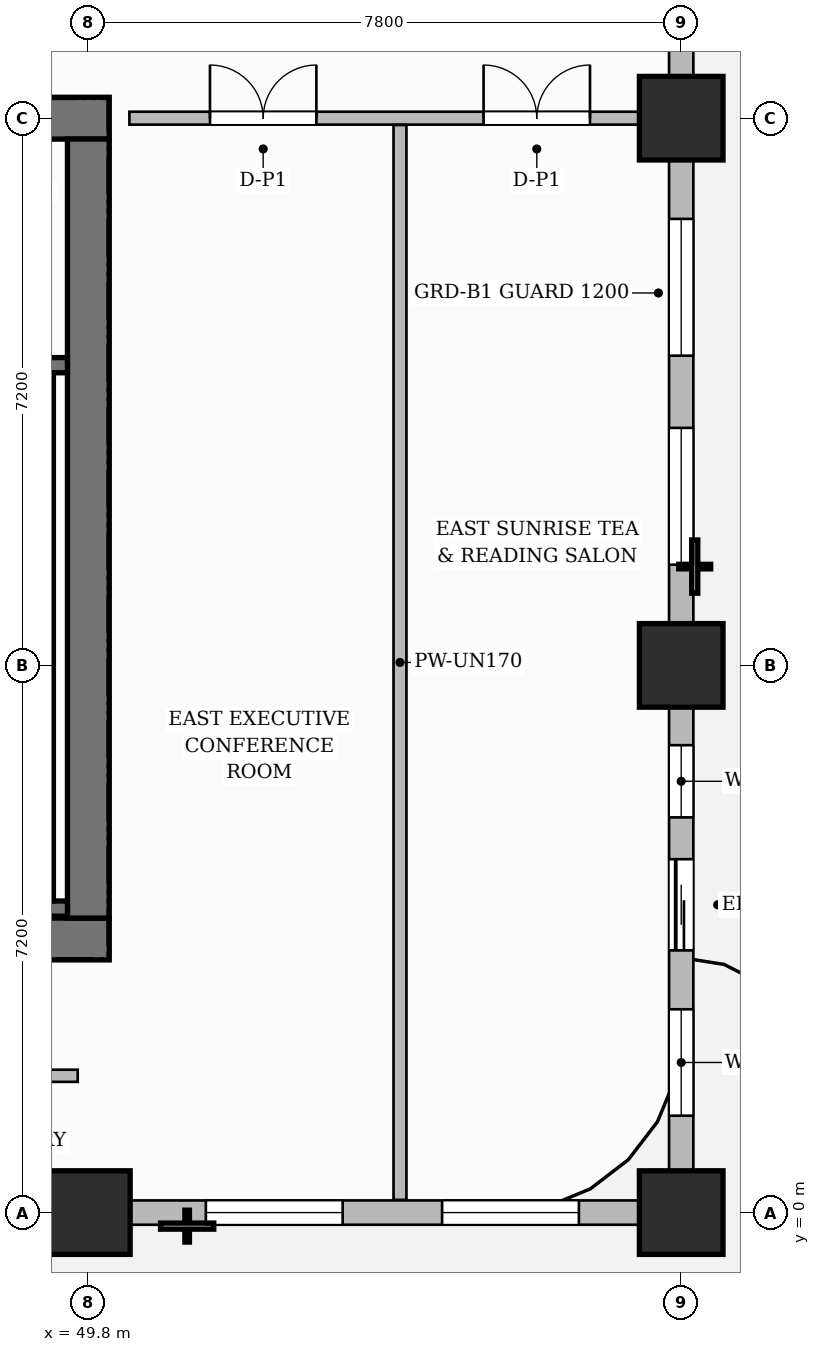
"""IFC4 building model, lengths in metres.
Left out: names, types, materials, properties, quantities, classifications, styles, units other than length and angle.
Written with IfcOpenShell. Run it as: python <this file> out.ifc"""

import sys

from ifc_helpers import new_model, si_unit, direction, frame, frame_2d, origin, origin_2d, place, context, subcontext, project, spatial, rectangle, extrude, source, transform, mapped, element, fill, save


model = new_model("IFC4")
c1 = context("Model", 3, precision=1e-05, world=origin(), true_north=direction((0.0, 1.0)))
c2 = subcontext(c1, "Body", "Model", "MODEL_VIEW")
j1 = project(units=[si_unit("LENGTHUNIT", "METRE"), si_unit("PLANEANGLEUNIT", "RADIAN")], contexts=[c1])
p1 = place(None, origin())
s1 = spatial("IfcSite", under=j1, at=p1, CompositionType="ELEMENT")
p2 = place(p1, origin())
s2 = spatial("IfcBuilding", under=s1, at=p2, CompositionType="ELEMENT")
p3 = place(p2, frame((0.0, 0.0, 99.0)))
s3 = spatial("IfcBuildingStorey", under=s2, at=p3, CompositionType="ELEMENT", Elevation=99.0)
p4 = place(p3, frame((34.525, 3.6, 0.0), z_axis=(0.0, 0.0, 1.0), x_axis=(1.0, 0.0, 0.0)))
e1 = element("IfcWall", 1, at=p4, inside=s3, PredefinedType="SHEAR", context=c2, shape_type="SweptSolid", body=[
    extrude(rectangle(XDim=15.55, YDim=0.55, at=frame_2d((7.775, 0.0))), origin(), (0.0, 0.0, 1.0), 3.7),
])
p5 = place(p4, frame((4.745, 0.0, 0.0)))
e2 = element("IfcOpeningElement", 2, at=p5, cuts=e1, PredefinedType="OPENING", context=c2, shape_type="SweptSolid", body=[
    extrude(rectangle(XDim=0.9, YDim=2.1, at=frame_2d((0.45, 1.05))), frame((0.0, 0.285, 0.0), z_axis=(0.0, -1.0, 0.0), x_axis=(1.0, 0.0, 0.0)), (0.0, 0.0, 1.0), 0.57),
])
p6 = place(p4, frame((7.125, 0.0, 0.0)))
e3 = element("IfcOpeningElement", 3, at=p6, cuts=e1, PredefinedType="OPENING", context=c2, shape_type="SweptSolid", body=[
    extrude(rectangle(XDim=0.9, YDim=2.1, at=frame_2d((0.45, 1.05))), frame((0.0, 0.285, 0.0), z_axis=(0.0, -1.0, 0.0), x_axis=(1.0, 0.0, 0.0)), (0.0, 0.0, 1.0), 0.57),
])
p7 = place(p3, frame((34.525, 14.4, 0.0), z_axis=(0.0, 0.0, 1.0), x_axis=(1.0, 0.0, 0.0)))
e4 = element("IfcWall", 4, at=p7, inside=s3, PredefinedType="SHEAR", context=c2, shape_type="SweptSolid", body=[
    extrude(rectangle(XDim=15.55, YDim=0.55, at=frame_2d((7.775, 0.0))), origin(), (0.0, 0.0, 1.0), 3.7),
])
p8 = place(p7, frame((5.405, 0.0, 0.0)))
e5 = element("IfcOpeningElement", 5, at=p8, cuts=e4, PredefinedType="OPENING", context=c2, shape_type="SweptSolid", body=[
    extrude(rectangle(XDim=1.5, YDim=2.2, at=frame_2d((0.75, 1.1))), frame((0.0, 0.285, 0.0), z_axis=(0.0, -1.0, 0.0), x_axis=(1.0, 0.0, 0.0)), (0.0, 0.0, 1.0), 0.57),
])
p9 = place(p7, frame((1.62, 0.0, 0.0)))
e6 = element("IfcOpeningElement", 6, at=p9, cuts=e4, PredefinedType="OPENING", context=c2, shape_type="SweptSolid", body=[
    extrude(rectangle(XDim=1.05, YDim=2.15, at=frame_2d((0.525, 1.075))), frame((0.0, 0.285, 0.0), z_axis=(0.0, -1.0, 0.0), x_axis=(1.0, 0.0, 0.0)), (0.0, 0.0, 1.0), 0.57),
])
p10 = place(p7, frame((11.25, 0.0, 0.0)))
e7 = element("IfcOpeningElement", 7, at=p10, cuts=e4, PredefinedType="OPENING", context=c2, shape_type="SweptSolid", body=[
    extrude(rectangle(XDim=1.05, YDim=2.15, at=frame_2d((0.525, 1.075))), frame((0.0, 0.285, 0.0), z_axis=(0.0, -1.0, 0.0), x_axis=(1.0, 0.0, 0.0)), (0.0, 0.0, 1.0), 0.57),
])
p11 = place(p3, frame((49.8, 3.875, 0.0), z_axis=(0.0, 0.0, 1.0), x_axis=(0.0, 1.0, 0.0)))
e8 = element("IfcWall", 8, at=p11, inside=s3, PredefinedType="SHEAR", context=c2, shape_type="SweptSolid", body=[
    extrude(rectangle(XDim=10.25, YDim=0.55, at=frame_2d((5.125, 0.0))), origin(), (0.0, 0.0, 1.0), 3.7),
])
m1 = source(origin(), c2, "Body", "SweptSolid", [
    extrude(rectangle(XDim=1.1, YDim=1.1, at=origin_2d()), origin(), (0.0, 0.0, 1.0), 3.7),
])
for number, where, z_axis, x_axis in (
    (9, (49.8, 0.0, 0.0), (0.0, 0.0, 1.0), (1.0, 0.0, 0.0)),
    (10, (57.6, 0.0, 0.0), (0.0, 0.0, 1.0), (1.0, 0.0, 0.0)),
    (11, (57.6, 7.2, 0.0), (0.0, 0.0, 1.0), (1.0, 0.0, 0.0)),
    (12, (57.6, 14.4, 0.0), (0.0, 0.0, 1.0), (1.0, 0.0, 0.0)),
):
    element("IfcColumn", number, at=place(p3, frame(where, z_axis=z_axis, x_axis=x_axis)), inside=s3, PredefinedType="COLUMN", context=c2, shape_type="MappedRepresentation", body=[
        mapped(m1, transform((0.0, 0.0, 0.0), scale=1.0)),
    ])
p12 = place(p3, frame((43.12, 4.0, 0.0), z_axis=(0.0, 0.0, 1.0), x_axis=(1.0, 0.0, 0.0)))
e13 = element("IfcWall", 13, at=p12, inside=s3, PredefinedType="SHEAR", context=c2, shape_type="SweptSolid", body=[
    extrude(rectangle(XDim=6.405, YDim=0.2, at=frame_2d((3.202, 0.0))), origin(), (0.0, 0.0, 1.0), 3.7),
])
p13 = place(p3, frame((49.24, 4.1, 0.0), z_axis=(0.0, 0.0, 1.0), x_axis=(0.0, 1.0, 0.0)))
e14 = element("IfcWall", 14, at=p13, inside=s3, PredefinedType="SHEAR", context=c2, shape_type="SweptSolid", body=[
    extrude(rectangle(XDim=6.95, YDim=0.2, at=frame_2d((3.475, 0.0))), origin(), (0.0, 0.0, 1.0), 3.7),
])
p14 = place(p3, frame((43.12, 11.15, 0.0), z_axis=(0.0, 0.0, 1.0), x_axis=(1.0, 0.0, 0.0)))
e15 = element("IfcWall", 15, at=p14, inside=s3, PredefinedType="SHEAR", context=c2, shape_type="SweptSolid", body=[
    extrude(rectangle(XDim=6.405, YDim=0.2, at=frame_2d((3.202, 0.0))), origin(), (0.0, 0.0, 1.0), 3.7),
])
p15 = place(p14, frame((1.045, 0.0, 0.0)))
e16 = element("IfcOpeningElement", 16, at=p15, cuts=e15, PredefinedType="OPENING", context=c2, shape_type="SweptSolid", body=[
    extrude(rectangle(XDim=1.05, YDim=2.2, at=frame_2d((0.525, 1.1))), frame((0.0, 0.11, 0.0), z_axis=(0.0, -1.0, 0.0), x_axis=(1.0, 0.0, 0.0)), (0.0, 0.0, 1.0), 0.22),
])
p16 = place(p14, frame((4.125, 0.0, 0.0)))
e17 = element("IfcOpeningElement", 17, at=p16, cuts=e15, PredefinedType="OPENING", context=c2, shape_type="SweptSolid", body=[
    extrude(rectangle(XDim=1.05, YDim=2.2, at=frame_2d((0.525, 1.1))), frame((0.0, 0.11, 0.0), z_axis=(0.0, -1.0, 0.0), x_axis=(1.0, 0.0, 0.0)), (0.0, 0.0, 1.0), 0.22),
])
p17 = place(p3, frame((30.29, 1.8, 0.0), z_axis=(0.0, 0.0, 1.0), x_axis=(1.0, 0.0, 0.0)))
e18 = element("IfcWall", 18, at=p17, inside=s3, PredefinedType="PARTITIONING", context=c2, shape_type="SweptSolid", body=[
    extrude(rectangle(XDim=19.37, YDim=0.16, at=frame_2d((9.685, 0.0))), origin(), (0.0, 0.0, 1.0), 3.45),
])
p18 = place(p17, frame((5.213, 0.0, 0.0)))
e19 = element("IfcOpeningElement", 19, at=p18, cuts=e18, PredefinedType="OPENING", context=c2, shape_type="SweptSolid", body=[
    extrude(rectangle(XDim=0.9, YDim=2.15, at=frame_2d((0.45, 1.075))), frame((0.0, 0.09, 0.0), z_axis=(0.0, -1.0, 0.0), x_axis=(1.0, 0.0, 0.0)), (0.0, 0.0, 1.0), 0.18),
])
p19 = place(p17, frame((14.06, 0.0, 0.0)))
e20 = element("IfcOpeningElement", 20, at=p19, cuts=e18, PredefinedType="OPENING", context=c2, shape_type="SweptSolid", body=[
    extrude(rectangle(XDim=0.9, YDim=2.15, at=frame_2d((0.45, 1.075))), frame((0.0, 0.09, 0.0), z_axis=(0.0, -1.0, 0.0), x_axis=(1.0, 0.0, 0.0)), (0.0, 0.0, 1.0), 0.18),
])
p20 = place(p3, frame((50.34, 14.4, 0.0), z_axis=(0.0, 0.0, 1.0), x_axis=(1.0, 0.0, 0.0)))
e21 = element("IfcWall", 21, at=p20, inside=s3, PredefinedType="PARTITIONING", context=c2, shape_type="SweptSolid", body=[
    extrude(rectangle(XDim=7.07, YDim=0.17, at=frame_2d((3.535, 0.0))), origin(), (0.0, 0.0, 1.0), 2.885),
])
p21 = place(p20, frame((1.06, 0.0, 0.0)))
e22 = element("IfcOpeningElement", 22, at=p21, cuts=e21, PredefinedType="OPENING", context=c2, shape_type="SweptSolid", body=[
    extrude(rectangle(XDim=1.4, YDim=2.35, at=frame_2d((0.7, 1.175))), frame((0.0, 0.095, 0.0), z_axis=(0.0, -1.0, 0.0), x_axis=(1.0, 0.0, 0.0)), (0.0, 0.0, 1.0), 0.19),
])
p22 = place(p20, frame((4.66, 0.0, 0.0)))
e23 = element("IfcOpeningElement", 23, at=p22, cuts=e21, PredefinedType="OPENING", context=c2, shape_type="SweptSolid", body=[
    extrude(rectangle(XDim=1.4, YDim=2.35, at=frame_2d((0.7, 1.175))), frame((0.0, 0.095, 0.0), z_axis=(0.0, -1.0, 0.0), x_axis=(1.0, 0.0, 0.0)), (0.0, 0.0, 1.0), 0.19),
])
p23 = place(p3, frame((53.9, 0.168, 0.0), z_axis=(0.0, 0.0, 1.0), x_axis=(0.0, 1.0, 0.0)))
e24 = element("IfcWall", 24, at=p23, inside=s3, PredefinedType="PARTITIONING", context=c2, shape_type="SweptSolid", body=[
    extrude(rectangle(XDim=14.142, YDim=0.17, at=frame_2d((7.071, 0.0))), origin(), (0.0, 0.0, 1.0), 3.075),
])
p24 = place(p3, frame((14.4, 0.0, 0.0), z_axis=(0.0, 0.0, 1.0), x_axis=(1.0, 0.0, 0.0)))
e25 = element("IfcWall", 25, at=p24, inside=s3, PredefinedType="SOLIDWALL", context=c2, shape_type="SweptSolid", body=[
    extrude(rectangle(XDim=43.2, YDim=0.32, at=frame_2d((21.6, 0.0))), origin(), (0.0, 0.0, 1.0), 2.885),
])
p25 = place(p24, frame((0.85, 0.0, 0.0)))
e26 = element("IfcOpeningElement", 26, at=p25, cuts=e25, PredefinedType="OPENING", context=c2, shape_type="SweptSolid", body=[
    extrude(rectangle(XDim=1.2, YDim=2.2, at=frame_2d((0.6, 1.1))), frame((0.0, 0.17, 0.0), z_axis=(0.0, -1.0, 0.0), x_axis=(1.0, 0.0, 0.0)), (0.0, 0.0, 1.0), 0.34),
])
p26 = place(p24, frame((2.746, 0.0, 0.8)))
e27 = element("IfcOpeningElement", 27, at=p26, cuts=e25, PredefinedType="OPENING", context=c2, shape_type="SweptSolid", body=[
    extrude(rectangle(XDim=1.15, YDim=1.8, at=frame_2d((0.575, 0.9))), frame((0.0, 0.17, 0.0), z_axis=(0.0, -1.0, 0.0), x_axis=(1.0, 0.0, 0.0)), (0.0, 0.0, 1.0), 0.34),
])
p27 = place(p24, frame((4.654, 0.0, 0.8)))
e28 = element("IfcOpeningElement", 28, at=p27, cuts=e25, PredefinedType="OPENING", context=c2, shape_type="SweptSolid", body=[
    extrude(rectangle(XDim=1.4, YDim=1.85, at=frame_2d((0.7, 0.925))), frame((0.0, 0.17, 0.0), z_axis=(0.0, -1.0, 0.0), x_axis=(1.0, 0.0, 0.0)), (0.0, 0.0, 1.0), 0.34),
])
p28 = place(p24, frame((8.181, 0.0, 0.8)))
e29 = element("IfcOpeningElement", 29, at=p28, cuts=e25, PredefinedType="OPENING", context=c2, shape_type="SweptSolid", body=[
    extrude(rectangle(XDim=0.95, YDim=1.75, at=frame_2d((0.475, 0.875))), frame((0.0, 0.17, 0.0), z_axis=(0.0, -1.0, 0.0), x_axis=(1.0, 0.0, 0.0)), (0.0, 0.0, 1.0), 0.34),
])
p29 = place(p24, frame((10.564, 0.0, 0.8)))
e30 = element("IfcOpeningElement", 30, at=p29, cuts=e25, PredefinedType="OPENING", context=c2, shape_type="SweptSolid", body=[
    extrude(rectangle(XDim=1.8, YDim=1.85, at=frame_2d((0.9, 0.925))), frame((0.0, 0.17, 0.0), z_axis=(0.0, -1.0, 0.0), x_axis=(1.0, 0.0, 0.0)), (0.0, 0.0, 1.0), 0.34),
])
p30 = place(p24, frame((16.804, 0.0, 0.8)))
e31 = element("IfcOpeningElement", 31, at=p30, cuts=e25, PredefinedType="OPENING", context=c2, shape_type="SweptSolid", body=[
    extrude(rectangle(XDim=1.8, YDim=1.85, at=frame_2d((0.9, 0.925))), frame((0.0, 0.17, 0.0), z_axis=(0.0, -1.0, 0.0), x_axis=(1.0, 0.0, 0.0)), (0.0, 0.0, 1.0), 0.34),
])
p31 = place(p24, frame((22.396, 0.0, 0.8)))
e32 = element("IfcOpeningElement", 32, at=p31, cuts=e25, PredefinedType="OPENING", context=c2, shape_type="SweptSolid", body=[
    extrude(rectangle(XDim=1.8, YDim=1.85, at=frame_2d((0.9, 0.925))), frame((0.0, 0.17, 0.0), z_axis=(0.0, -1.0, 0.0), x_axis=(1.0, 0.0, 0.0)), (0.0, 0.0, 1.0), 0.34),
])
p32 = place(p24, frame((25.629, 0.0, 0.8)))
e33 = element("IfcOpeningElement", 33, at=p32, cuts=e25, PredefinedType="OPENING", context=c2, shape_type="SweptSolid", body=[
    extrude(rectangle(XDim=0.95, YDim=1.75, at=frame_2d((0.475, 0.875))), frame((0.0, 0.17, 0.0), z_axis=(0.0, -1.0, 0.0), x_axis=(1.0, 0.0, 0.0)), (0.0, 0.0, 1.0), 0.34),
])
p33 = place(p24, frame((29.075, 0.0, 0.8)))
e34 = element("IfcOpeningElement", 34, at=p33, cuts=e25, PredefinedType="OPENING", context=c2, shape_type="SweptSolid", body=[
    extrude(rectangle(XDim=1.8, YDim=1.85, at=frame_2d((0.9, 0.925))), frame((0.0, 0.17, 0.0), z_axis=(0.0, -1.0, 0.0), x_axis=(1.0, 0.0, 0.0)), (0.0, 0.0, 1.0), 0.34),
])
p34 = place(p24, frame((32.125, 0.0, 0.8)))
e35 = element("IfcOpeningElement", 35, at=p34, cuts=e25, PredefinedType="OPENING", context=c2, shape_type="SweptSolid", body=[
    extrude(rectangle(XDim=1.8, YDim=1.85, at=frame_2d((0.9, 0.925))), frame((0.0, 0.17, 0.0), z_axis=(0.0, -1.0, 0.0), x_axis=(1.0, 0.0, 0.0)), (0.0, 0.0, 1.0), 0.34),
])
p35 = place(p24, frame((36.946, 0.0, 0.8)))
e36 = element("IfcOpeningElement", 36, at=p35, cuts=e25, PredefinedType="OPENING", context=c2, shape_type="SweptSolid", body=[
    extrude(rectangle(XDim=1.8, YDim=1.85, at=frame_2d((0.9, 0.925))), frame((0.0, 0.17, 0.0), z_axis=(0.0, -1.0, 0.0), x_axis=(1.0, 0.0, 0.0)), (0.0, 0.0, 1.0), 0.34),
])
p36 = place(p24, frame((40.054, 0.0, 0.8)))
e37 = element("IfcOpeningElement", 37, at=p36, cuts=e25, PredefinedType="OPENING", context=c2, shape_type="SweptSolid", body=[
    extrude(rectangle(XDim=1.8, YDim=1.85, at=frame_2d((0.9, 0.925))), frame((0.0, 0.17, 0.0), z_axis=(0.0, -1.0, 0.0), x_axis=(1.0, 0.0, 0.0)), (0.0, 0.0, 1.0), 0.34),
])
p37 = place(p3, frame((57.6, 0.05, 0.0), z_axis=(0.0, 0.0, 1.0), x_axis=(0.0, 1.0, 0.0)))
e38 = element("IfcWall", 38, at=p37, inside=s3, PredefinedType="SOLIDWALL", context=c2, shape_type="SweptSolid", body=[
    extrude(rectangle(XDim=21.5, YDim=0.32, at=frame_2d((10.75, 0.0))), origin(), (0.0, 0.0, 1.0), 2.885),
])
p38 = place(p37, frame((3.4, 0.0, 0.0)))
e39 = element("IfcOpeningElement", 39, at=p38, cuts=e38, PredefinedType="OPENING", context=c2, shape_type="SweptSolid", body=[
    extrude(rectangle(XDim=1.2, YDim=2.2, at=frame_2d((0.6, 1.1))), frame((0.0, 0.17, 0.0), z_axis=(0.0, -1.0, 0.0), x_axis=(1.0, 0.0, 0.0)), (0.0, 0.0, 1.0), 0.34),
])
p39 = place(p37, frame((1.225, 0.0, 0.8)))
e40 = element("IfcOpeningElement", 40, at=p39, cuts=e38, PredefinedType="OPENING", context=c2, shape_type="SweptSolid", body=[
    extrude(rectangle(XDim=1.4, YDim=1.85, at=frame_2d((0.7, 0.925))), frame((0.0, 0.17, 0.0), z_axis=(0.0, -1.0, 0.0), x_axis=(1.0, 0.0, 0.0)), (0.0, 0.0, 1.0), 0.34),
])
p40 = place(p37, frame((5.15, 0.0, 0.8)))
e41 = element("IfcOpeningElement", 41, at=p40, cuts=e38, PredefinedType="OPENING", context=c2, shape_type="SweptSolid", body=[
    extrude(rectangle(XDim=0.95, YDim=1.75, at=frame_2d((0.475, 0.875))), frame((0.0, 0.17, 0.0), z_axis=(0.0, -1.0, 0.0), x_axis=(1.0, 0.0, 0.0)), (0.0, 0.0, 1.0), 0.34),
])
p41 = place(p37, frame((8.475, 0.0, 0.8)))
e42 = element("IfcOpeningElement", 42, at=p41, cuts=e38, PredefinedType="OPENING", context=c2, shape_type="SweptSolid", body=[
    extrude(rectangle(XDim=1.8, YDim=1.85, at=frame_2d((0.9, 0.925))), frame((0.0, 0.17, 0.0), z_axis=(0.0, -1.0, 0.0), x_axis=(1.0, 0.0, 0.0)), (0.0, 0.0, 1.0), 0.34),
])
p42 = place(p37, frame((11.225, 0.0, 0.8)))
e43 = element("IfcOpeningElement", 43, at=p42, cuts=e38, PredefinedType="OPENING", context=c2, shape_type="SweptSolid", body=[
    extrude(rectangle(XDim=1.8, YDim=1.85, at=frame_2d((0.9, 0.925))), frame((0.0, 0.17, 0.0), z_axis=(0.0, -1.0, 0.0), x_axis=(1.0, 0.0, 0.0)), (0.0, 0.0, 1.0), 0.34),
])
p43 = place(p37, frame((15.471, 0.0, 0.8)))
e44 = element("IfcOpeningElement", 44, at=p43, cuts=e38, PredefinedType="OPENING", context=c2, shape_type="SweptSolid", body=[
    extrude(rectangle(XDim=1.15, YDim=1.8, at=frame_2d((0.575, 0.9))), frame((0.0, 0.17, 0.0), z_axis=(0.0, -1.0, 0.0), x_axis=(1.0, 0.0, 0.0)), (0.0, 0.0, 1.0), 0.34),
])
p44 = place(p37, frame((17.954, 0.0, 0.8)))
e45 = element("IfcOpeningElement", 45, at=p44, cuts=e38, PredefinedType="OPENING", context=c2, shape_type="SweptSolid", body=[
    extrude(rectangle(XDim=1.8, YDim=1.85, at=frame_2d((0.9, 0.925))), frame((0.0, 0.17, 0.0), z_axis=(0.0, -1.0, 0.0), x_axis=(1.0, 0.0, 0.0)), (0.0, 0.0, 1.0), 0.34),
])
m2 = source(origin(), c2, "Body", "SweptSolid", [
    extrude(rectangle(XDim=1.4, YDim=2.35, at=frame_2d((0.7, 1.175))), frame((0.0, 0.025, 0.0), z_axis=(0.0, -1.0, 0.0), x_axis=(1.0, 0.0, 0.0)), (0.0, 0.0, 1.0), 0.05),
])
p45 = place(p21, origin())
e46 = element("IfcDoor", 46, at=p45, inside=s3, OperationType="DOUBLE_DOOR_SINGLE_SWING", PredefinedType="DOOR", context=c2, shape_type="MappedRepresentation", body=[
    mapped(m2, transform((0.0, 0.0, 0.0), scale=1.0)),
])
fill(e22, e46)
p46 = place(p22, origin())
e47 = element("IfcDoor", 47, at=p46, inside=s3, OperationType="DOUBLE_DOOR_SINGLE_SWING", PredefinedType="DOOR", context=c2, shape_type="MappedRepresentation", body=[
    mapped(m2, transform((0.0, 0.0, 0.0), scale=1.0)),
])
fill(e23, e47)
m3 = source(origin(), c2, "Body", "SweptSolid", [
    extrude(rectangle(XDim=1.2, YDim=2.2, at=frame_2d((0.6, 1.1))), frame((0.0, 0.025, 0.0), z_axis=(0.0, -1.0, 0.0), x_axis=(1.0, 0.0, 0.0)), (0.0, 0.0, 1.0), 0.05),
])
p47 = place(p38, origin())
e48 = element("IfcDoor", 48, at=p47, inside=s3, OperationType="SLIDING_TO_LEFT", PredefinedType="DOOR", context=c2, shape_type="MappedRepresentation", body=[
    mapped(m3, transform((0.0, 0.0, 0.0), scale=1.0)),
])
fill(e39, e48)
m4 = source(origin(), c2, "Body", "SweptSolid", [
    extrude(rectangle(XDim=1.8, YDim=1.85, at=frame_2d((0.9, 0.925))), frame((0.0, 0.03, 0.0), z_axis=(0.0, -1.0, 0.0), x_axis=(1.0, 0.0, 0.0)), (0.0, 0.0, 1.0), 0.06),
])
p48 = place(p35, origin())
e49 = element("IfcWindow", 49, at=p48, inside=s3, PartitioningType="DOUBLE_PANEL_VERTICAL", PredefinedType="WINDOW", context=c2, shape_type="MappedRepresentation", body=[
    mapped(m4, transform((0.0, 0.0, 0.0), scale=1.0)),
])
fill(e36, e49)
p49 = place(p36, origin())
e50 = element("IfcWindow", 50, at=p49, inside=s3, PartitioningType="DOUBLE_PANEL_VERTICAL", PredefinedType="WINDOW", context=c2, shape_type="MappedRepresentation", body=[
    mapped(m4, transform((0.0, 0.0, 0.0), scale=1.0)),
])
fill(e37, e50)
m5 = source(origin(), c2, "Body", "SweptSolid", [
    extrude(rectangle(XDim=1.4, YDim=1.85, at=frame_2d((0.7, 0.925))), frame((0.0, 0.03, 0.0), z_axis=(0.0, -1.0, 0.0), x_axis=(1.0, 0.0, 0.0)), (0.0, 0.0, 1.0), 0.06),
])
p50 = place(p39, origin())
e51 = element("IfcWindow", 51, at=p50, inside=s3, PartitioningType="SINGLE_PANEL", PredefinedType="WINDOW", context=c2, shape_type="MappedRepresentation", body=[
    mapped(m5, transform((0.0, 0.0, 0.0), scale=1.0)),
])
fill(e40, e51)
m6 = source(origin(), c2, "Body", "SweptSolid", [
    extrude(rectangle(XDim=0.95, YDim=1.75, at=frame_2d((0.475, 0.875))), frame((0.0, 0.03, 0.0), z_axis=(0.0, -1.0, 0.0), x_axis=(1.0, 0.0, 0.0)), (0.0, 0.0, 1.0), 0.06),
])
p51 = place(p40, origin())
e52 = element("IfcWindow", 52, at=p51, inside=s3, PartitioningType="SINGLE_PANEL", PredefinedType="WINDOW", context=c2, shape_type="MappedRepresentation", body=[
    mapped(m6, transform((0.0, 0.0, 0.0), scale=1.0)),
])
fill(e41, e52)
p52 = place(p41, origin())
e53 = element("IfcWindow", 53, at=p52, inside=s3, PartitioningType="DOUBLE_PANEL_VERTICAL", PredefinedType="WINDOW", context=c2, shape_type="MappedRepresentation", body=[
    mapped(m4, transform((0.0, 0.0, 0.0), scale=1.0)),
])
fill(e42, e53)
p53 = place(p42, origin())
e54 = element("IfcWindow", 54, at=p53, inside=s3, PartitioningType="DOUBLE_PANEL_VERTICAL", PredefinedType="WINDOW", context=c2, shape_type="MappedRepresentation", body=[
    mapped(m4, transform((0.0, 0.0, 0.0), scale=1.0)),
])
fill(e43, e54)
save(model, sys.argv[1])
